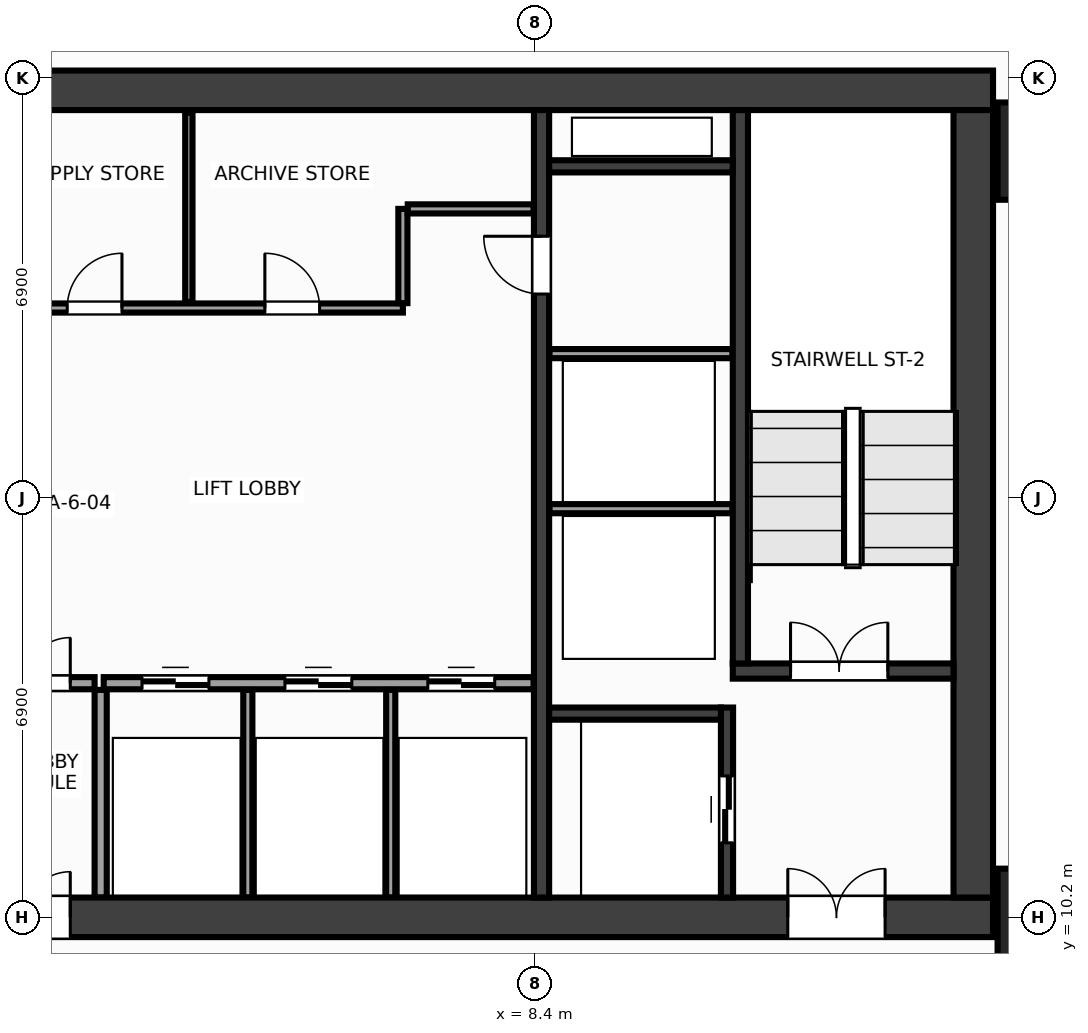
"""IFC4 building model, lengths in metres.
Left out: names, types, materials, properties, quantities, classifications, styles, units other than length and angle.
Written with IfcOpenShell. Run it as: python <this file> out.ifc"""

import sys

from ifc_helpers import new_model, si_unit, direction, frame, frame_2d, origin, origin_2d, place, context, subcontext, project, spatial, rectangle, extrude, source, transform, mapped, element, fill, save


model = new_model("IFC4")
c1 = context("Model", 3, precision=1e-05, world=origin(), true_north=direction((0.0, 1.0)))
c2 = subcontext(c1, "Body", "Model", "MODEL_VIEW")
j1 = project(units=[si_unit("LENGTHUNIT", "METRE"), si_unit("PLANEANGLEUNIT", "RADIAN")], contexts=[c1])
p1 = place(None, origin())
s1 = spatial("IfcSite", under=j1, at=p1, CompositionType="ELEMENT")
p2 = place(p1, origin())
s2 = spatial("IfcBuilding", under=s1, at=p2, CompositionType="ELEMENT")
p3 = place(p2, frame((0.0, 0.0, 95.6)))
s3 = spatial("IfcBuildingStorey", under=s2, at=p3, CompositionType="ELEMENT", Elevation=95.6)
m1 = source(origin(), c2, "Body", "SweptSolid", [
    extrude(rectangle(XDim=31.85, YDim=0.65, at=frame_2d((15.925, 0.0))), origin(), (0.0, 0.0, 1.0), 3.6),
])
p4 = place(p3, frame((-15.925, 23.8, 0.0), z_axis=(0.0, 0.0, 1.0), x_axis=(1.0, 0.0, 0.0)))
e1 = element("IfcWall", 1, at=p4, inside=s3, PredefinedType="SHEAR", context=c2, shape_type="MappedRepresentation", body=[
    mapped(m1, transform((0.0, 0.0, 0.0), x_axis=(1.0, 0.0, 0.0), y_axis=(0.0, 1.0, 0.0), z_axis=(0.0, 0.0, 1.0), scale=1.0)),
])
p5 = place(p3, frame((-15.925, 10.2, 0.0), z_axis=(0.0, 0.0, 1.0), x_axis=(1.0, 0.0, 0.0)))
e2 = element("IfcWall", 2, at=p5, inside=s3, PredefinedType="SHEAR", context=c2, shape_type="MappedRepresentation", body=[
    mapped(m1, transform((0.0, 0.0, 0.0), x_axis=(1.0, 0.0, 0.0), y_axis=(0.0, 1.0, 0.0), z_axis=(0.0, 0.0, 1.0), scale=1.0)),
])
p6 = place(p5, frame((1.775, 0.0, 0.0)))
e3 = element("IfcOpeningElement", 3, at=p6, cuts=e2, PredefinedType="OPENING", context=c2, shape_type="SweptSolid", body=[
    extrude(rectangle(XDim=1.6, YDim=2.15, at=frame_2d((0.8, 1.075))), frame((0.0, 0.337, 0.0), z_axis=(0.0, -1.0, 0.0), x_axis=(1.0, 0.0, 0.0)), (0.0, 0.0, 1.0), 0.674),
])
p7 = place(p5, frame((28.475, 0.0, 0.0)))
e4 = element("IfcOpeningElement", 4, at=p7, cuts=e2, PredefinedType="OPENING", context=c2, shape_type="SweptSolid", body=[
    extrude(rectangle(XDim=1.6, YDim=2.15, at=frame_2d((0.8, 1.075))), frame((0.0, 0.337, 0.0), z_axis=(0.0, -1.0, 0.0), x_axis=(1.0, 0.0, 0.0)), (0.0, 0.0, 1.0), 0.674),
])
p8 = place(p5, frame((15.175, 0.0, 0.0)))
e5 = element("IfcOpeningElement", 5, at=p8, cuts=e2, PredefinedType="OPENING", context=c2, shape_type="SweptSolid", body=[
    extrude(rectangle(XDim=1.5, YDim=2.2, at=frame_2d((0.75, 1.1))), frame((0.0, 0.337, 0.0), z_axis=(0.0, -1.0, 0.0), x_axis=(1.0, 0.0, 0.0)), (0.0, 0.0, 1.0), 0.674),
])
m2 = source(origin(), c2, "Body", "SweptSolid", [
    extrude(rectangle(XDim=12.95, YDim=0.65, at=frame_2d((6.475, 0.0))), origin(), (0.0, 0.0, 1.0), 3.6),
])
p9 = place(p3, frame((15.6, 10.525, 0.0), z_axis=(0.0, 0.0, 1.0), x_axis=(0.0, 1.0, 0.0)))
e6 = element("IfcWall", 6, at=p9, inside=s3, PredefinedType="SHEAR", context=c2, shape_type="MappedRepresentation", body=[
    mapped(m2, transform((0.0, 0.0, 0.0), x_axis=(1.0, 0.0, 0.0), y_axis=(0.0, 1.0, 0.0), z_axis=(0.0, 0.0, 1.0), scale=1.0)),
])
m3 = source(origin(), c2, "Body", "SweptSolid", [
    extrude(rectangle(XDim=12.95, YDim=0.25, at=frame_2d((6.475, 0.0))), origin(), (0.0, 0.0, 1.0), 3.6),
])
p10 = place(p3, frame((8.5, 10.525, 0.0), z_axis=(0.0, 0.0, 1.0), x_axis=(0.0, 1.0, 0.0)))
e7 = element("IfcWall", 7, at=p10, inside=s3, PredefinedType="SHEAR", context=c2, shape_type="MappedRepresentation", body=[
    mapped(m3, transform((0.0, 0.0, 0.0), x_axis=(1.0, 0.0, 0.0), y_axis=(0.0, 1.0, 0.0), z_axis=(0.0, 0.0, 1.0), scale=1.0)),
])
p11 = place(p10, frame((9.925, 0.0, 0.0)))
e8 = element("IfcOpeningElement", 8, at=p11, cuts=e7, PredefinedType="OPENING", context=c2, shape_type="SweptSolid", body=[
    extrude(rectangle(XDim=0.95, YDim=2.15, at=frame_2d((0.475, 1.075))), frame((0.0, 0.137, 0.0), z_axis=(0.0, -1.0, 0.0), x_axis=(1.0, 0.0, 0.0)), (0.0, 0.0, 1.0), 0.274),
])
m4 = source(origin(), c2, "Body", "SweptSolid", [
    extrude(rectangle(XDim=3.63, YDim=0.25, at=frame_2d((1.815, 0.0))), origin(), (0.0, 0.0, 1.0), 3.6),
])
p12 = place(p3, frame((11.645, 14.25, 0.0), z_axis=(0.0, 0.0, 1.0), x_axis=(1.0, 0.0, 0.0)))
e9 = element("IfcWall", 9, at=p12, inside=s3, PredefinedType="SHEAR", context=c2, shape_type="MappedRepresentation", body=[
    mapped(m4, transform((0.0, 0.0, 0.0), x_axis=(1.0, 0.0, 0.0), y_axis=(0.0, 1.0, 0.0), z_axis=(0.0, 0.0, 1.0), scale=1.0)),
])
p13 = place(p12, frame((0.95, 0.0, 0.0)))
e10 = element("IfcOpeningElement", 10, at=p13, cuts=e9, PredefinedType="OPENING", context=c2, shape_type="SweptSolid", body=[
    extrude(rectangle(XDim=1.6, YDim=2.15, at=frame_2d((0.8, 1.075))), frame((0.0, 0.137, 0.0), z_axis=(0.0, -1.0, 0.0), x_axis=(1.0, 0.0, 0.0)), (0.0, 0.0, 1.0), 0.274),
])
m5 = source(origin(), c2, "Body", "SweptSolid", [
    extrude(rectangle(XDim=9.1, YDim=0.25, at=frame_2d((4.55, 0.0))), origin(), (0.0, 0.0, 1.0), 3.6),
])
p14 = place(p3, frame((11.77, 14.375, 0.0), z_axis=(0.0, 0.0, 1.0), x_axis=(0.0, 1.0, 0.0)))
e11 = element("IfcWall", 11, at=p14, inside=s3, PredefinedType="SHEAR", context=c2, shape_type="MappedRepresentation", body=[
    mapped(m5, transform((0.0, 0.0, 0.0), x_axis=(1.0, 0.0, 0.0), y_axis=(0.0, 1.0, 0.0), z_axis=(0.0, 0.0, 1.0), scale=1.0)),
])
m6 = source(origin(), c2, "Body", "SweptSolid", [
    extrude(rectangle(XDim=3.125, YDim=0.2, at=frame_2d((1.562, 0.0))), origin(), (0.0, 0.0, 1.0), 3.6),
])
p15 = place(p3, frame((11.55, 10.525, 0.0), z_axis=(0.0, 0.0, 1.0), x_axis=(0.0, 1.0, 0.0)))
e12 = element("IfcWall", 12, at=p15, inside=s3, PredefinedType="SHEAR", context=c2, shape_type="MappedRepresentation", body=[
    mapped(m6, transform((0.0, 0.0, 0.0), x_axis=(1.0, 0.0, 0.0), y_axis=(0.0, 1.0, 0.0), z_axis=(0.0, 0.0, 1.0), scale=1.0)),
])
p16 = place(p15, frame((0.9, 0.0, 0.0)))
e13 = element("IfcOpeningElement", 13, at=p16, cuts=e12, PredefinedType="OPENING", context=c2, shape_type="SweptSolid", body=[
    extrude(rectangle(XDim=1.1, YDim=2.15, at=frame_2d((0.55, 1.075))), frame((0.0, 0.112, 0.0), z_axis=(0.0, -1.0, 0.0), x_axis=(1.0, 0.0, 0.0)), (0.0, 0.0, 1.0), 0.224),
])
m7 = source(origin(), c2, "Body", "SweptSolid", [
    extrude(rectangle(XDim=2.825, YDim=0.2, at=frame_2d((1.413, 0.0))), origin(), (0.0, 0.0, 1.0), 3.6),
])
p17 = place(p3, frame((8.625, 13.55, 0.0), z_axis=(0.0, 0.0, 1.0), x_axis=(1.0, 0.0, 0.0)))
e14 = element("IfcWall", 14, at=p17, inside=s3, PredefinedType="SHEAR", context=c2, shape_type="MappedRepresentation", body=[
    mapped(m7, transform((0.0, 0.0, 0.0), x_axis=(1.0, 0.0, 0.0), y_axis=(0.0, 1.0, 0.0), z_axis=(0.0, 0.0, 1.0), scale=1.0)),
])
m8 = source(origin(), c2, "Body", "SweptSolid", [
    extrude(rectangle(XDim=3.02, YDim=0.2, at=frame_2d((1.51, 0.0))), origin(), (0.0, 0.0, 1.0), 3.6),
])
p18 = place(p3, frame((8.625, 22.55, 0.0), z_axis=(0.0, 0.0, 1.0), x_axis=(1.0, 0.0, 0.0)))
e15 = element("IfcWall", 15, at=p18, inside=s3, PredefinedType="SHEAR", context=c2, shape_type="MappedRepresentation", body=[
    mapped(m8, transform((0.0, 0.0, 0.0), x_axis=(1.0, 0.0, 0.0), y_axis=(0.0, 1.0, 0.0), z_axis=(0.0, 0.0, 1.0), scale=1.0)),
])
m9 = source(origin(), c2, "Body", "SweptSolid", [
    extrude(rectangle(XDim=1.6, YDim=1.6, at=origin_2d()), origin(), (0.0, 0.0, 1.0), 3.6),
])
for number, where, z_axis, x_axis in (
    (16, (16.8, 10.2, 0.0), (0.0, 0.0, 1.0), (1.0, 0.0, 0.0)),
    (17, (16.8, 22.8, 0.0), (0.0, 0.0, 1.0), (1.0, 0.0, 0.0)),
):
    element("IfcColumn", number, at=place(p3, frame(where, z_axis=z_axis, x_axis=x_axis)), inside=s3, PredefinedType="COLUMN", context=c2, shape_type="MappedRepresentation", body=[
        mapped(m9, transform((0.0, 0.0, 0.0), x_axis=(1.0, 0.0, 0.0), y_axis=(0.0, 1.0, 0.0), z_axis=(0.0, 0.0, 1.0), scale=1.0)),
    ])
m10 = source(origin(), c2, "Body", "SweptSolid", [
    extrude(rectangle(XDim=3.01, YDim=0.15, at=frame_2d((1.505, 0.0))), origin(), (0.0, 0.0, 1.0), 3.36),
])
for number, where, z_axis, x_axis in (
    (18, (8.63, 16.92, 0.0), (0.0, 0.0, 1.0), (1.0, 0.0, 0.0)),
    (19, (8.63, 19.47, 0.0), (0.0, 0.0, 1.0), (1.0, 0.0, 0.0)),
):
    element("IfcWall", number, at=place(p3, frame(where, z_axis=z_axis, x_axis=x_axis)), inside=s3, PredefinedType="PARTITIONING", context=c2, shape_type="MappedRepresentation", body=[
        mapped(m10, transform((0.0, 0.0, 0.0), x_axis=(1.0, 0.0, 0.0), y_axis=(0.0, 1.0, 0.0), z_axis=(0.0, 0.0, 1.0), scale=1.0)),
    ])
m11 = source(origin(), c2, "Body", "SweptSolid", [
    extrude(rectangle(XDim=7.07, YDim=0.2, at=frame_2d((3.535, 0.0))), origin(), (0.0, 0.0, 1.0), 3.36),
])
p19 = place(p3, frame((1.3, 14.05, 0.0), z_axis=(0.0, 0.0, 1.0), x_axis=(1.0, 0.0, 0.0)))
e20 = element("IfcWall", 20, at=p19, inside=s3, PredefinedType="PARTITIONING", context=c2, shape_type="MappedRepresentation", body=[
    mapped(m11, transform((0.0, 0.0, 0.0), x_axis=(1.0, 0.0, 0.0), y_axis=(0.0, 1.0, 0.0), z_axis=(0.0, 0.0, 1.0), scale=1.0)),
])
p20 = place(p19, frame((0.63, 0.0, 0.0)))
e21 = element("IfcOpeningElement", 21, at=p20, cuts=e20, PredefinedType="OPENING", context=c2, shape_type="SweptSolid", body=[
    extrude(rectangle(XDim=1.1, YDim=2.15, at=frame_2d((0.55, 1.075))), frame((0.0, 0.112, 0.0), z_axis=(0.0, -1.0, 0.0), x_axis=(1.0, 0.0, 0.0)), (0.0, 0.0, 1.0), 0.224),
])
p21 = place(p19, frame((2.98, 0.0, 0.0)))
e22 = element("IfcOpeningElement", 22, at=p21, cuts=e20, PredefinedType="OPENING", context=c2, shape_type="SweptSolid", body=[
    extrude(rectangle(XDim=1.1, YDim=2.15, at=frame_2d((0.55, 1.075))), frame((0.0, 0.112, 0.0), z_axis=(0.0, -1.0, 0.0), x_axis=(1.0, 0.0, 0.0)), (0.0, 0.0, 1.0), 0.224),
])
p22 = place(p19, frame((5.33, 0.0, 0.0)))
e23 = element("IfcOpeningElement", 23, at=p22, cuts=e20, PredefinedType="OPENING", context=c2, shape_type="SweptSolid", body=[
    extrude(rectangle(XDim=1.1, YDim=2.15, at=frame_2d((0.55, 1.075))), frame((0.0, 0.112, 0.0), z_axis=(0.0, -1.0, 0.0), x_axis=(1.0, 0.0, 0.0)), (0.0, 0.0, 1.0), 0.224),
])
m12 = source(origin(), c2, "Body", "SweptSolid", [
    extrude(rectangle(XDim=3.415, YDim=0.2, at=frame_2d((1.708, 0.0))), origin(), (0.0, 0.0, 1.0), 3.36),
])
p23 = place(p3, frame((1.25, 10.525, 0.0), z_axis=(0.0, 0.0, 1.0), x_axis=(0.0, 1.0, 0.0)))
e24 = element("IfcWall", 24, at=p23, inside=s3, PredefinedType="PARTITIONING", context=c2, shape_type="MappedRepresentation", body=[
    mapped(m12, transform((0.0, 0.0, 0.0), x_axis=(1.0, 0.0, 0.0), y_axis=(0.0, 1.0, 0.0), z_axis=(0.0, 0.0, 1.0), scale=1.0)),
])
m13 = source(origin(), c2, "Body", "SweptSolid", [
    extrude(rectangle(XDim=2.3, YDim=0.2, at=frame_2d((1.15, 0.0))), origin(), (0.0, 0.0, 1.0), 3.36),
])
p24 = place(p3, frame((-1.15, 14.05, 0.0), z_axis=(0.0, 0.0, 1.0), x_axis=(1.0, 0.0, 0.0)))
e25 = element("IfcWall", 25, at=p24, inside=s3, PredefinedType="PARTITIONING", context=c2, shape_type="MappedRepresentation", body=[
    mapped(m13, transform((0.0, 0.0, 0.0), x_axis=(1.0, 0.0, 0.0), y_axis=(0.0, 1.0, 0.0), z_axis=(0.0, 0.0, 1.0), scale=1.0)),
])
p25 = place(p24, frame((0.4, 0.0, 0.0)))
e26 = element("IfcOpeningElement", 26, at=p25, cuts=e25, PredefinedType="OPENING", context=c2, shape_type="SweptSolid", body=[
    extrude(rectangle(XDim=1.5, YDim=2.2, at=frame_2d((0.75, 1.1))), frame((0.0, 0.112, 0.0), z_axis=(0.0, -1.0, 0.0), x_axis=(1.0, 0.0, 0.0)), (0.0, 0.0, 1.0), 0.224),
])
m14 = source(origin(), c2, "Body", "SweptSolid", [
    extrude(rectangle(XDim=14.59, YDim=0.15, at=frame_2d((7.295, 0.0))), origin(), (0.0, 0.0, 1.0), 3.36),
])
p26 = place(p3, frame((-8.37, 20.22, 0.0), z_axis=(0.0, 0.0, 1.0), x_axis=(1.0, 0.0, 0.0)))
e27 = element("IfcWall", 27, at=p26, inside=s3, PredefinedType="PARTITIONING", context=c2, shape_type="MappedRepresentation", body=[
    mapped(m14, transform((0.0, 0.0, 0.0), x_axis=(1.0, 0.0, 0.0), y_axis=(0.0, 1.0, 0.0), z_axis=(0.0, 0.0, 1.0), scale=1.0)),
])
p27 = place(p26, frame((0.86, 0.0, 0.0)))
e28 = element("IfcOpeningElement", 28, at=p27, cuts=e27, PredefinedType="OPENING", context=c2, shape_type="SweptSolid", body=[
    extrude(rectangle(XDim=0.9, YDim=2.15, at=frame_2d((0.45, 1.075))), frame((0.0, 0.087, 0.0), z_axis=(0.0, -1.0, 0.0), x_axis=(1.0, 0.0, 0.0)), (0.0, 0.0, 1.0), 0.174),
])
p28 = place(p26, frame((3.47, 0.0, 0.0)))
e29 = element("IfcOpeningElement", 29, at=p28, cuts=e27, PredefinedType="OPENING", context=c2, shape_type="SweptSolid", body=[
    extrude(rectangle(XDim=0.9, YDim=2.15, at=frame_2d((0.45, 1.075))), frame((0.0, 0.087, 0.0), z_axis=(0.0, -1.0, 0.0), x_axis=(1.0, 0.0, 0.0)), (0.0, 0.0, 1.0), 0.174),
])
p29 = place(p26, frame((6.17, 0.0, 0.0)))
e30 = element("IfcOpeningElement", 30, at=p29, cuts=e27, PredefinedType="OPENING", context=c2, shape_type="SweptSolid", body=[
    extrude(rectangle(XDim=0.9, YDim=2.15, at=frame_2d((0.45, 1.075))), frame((0.0, 0.087, 0.0), z_axis=(0.0, -1.0, 0.0), x_axis=(1.0, 0.0, 0.0)), (0.0, 0.0, 1.0), 0.174),
])
p30 = place(p26, frame((9.07, 0.0, 0.0)))
e31 = element("IfcOpeningElement", 31, at=p30, cuts=e27, PredefinedType="OPENING", context=c2, shape_type="SweptSolid", body=[
    extrude(rectangle(XDim=0.9, YDim=2.15, at=frame_2d((0.45, 1.075))), frame((0.0, 0.087, 0.0), z_axis=(0.0, -1.0, 0.0), x_axis=(1.0, 0.0, 0.0)), (0.0, 0.0, 1.0), 0.174),
])
p31 = place(p26, frame((12.32, 0.0, 0.0)))
e32 = element("IfcOpeningElement", 32, at=p31, cuts=e27, PredefinedType="OPENING", context=c2, shape_type="SweptSolid", body=[
    extrude(rectangle(XDim=0.9, YDim=2.15, at=frame_2d((0.45, 1.075))), frame((0.0, 0.087, 0.0), z_axis=(0.0, -1.0, 0.0), x_axis=(1.0, 0.0, 0.0)), (0.0, 0.0, 1.0), 0.174),
])
m15 = source(origin(), c2, "Body", "SweptSolid", [
    extrude(rectangle(XDim=1.55, YDim=0.15, at=frame_2d((0.775, 0.0))), origin(), (0.0, 0.0, 1.0), 3.36),
])
p32 = place(p3, frame((6.22, 20.3, 0.0), z_axis=(0.0, 0.0, 1.0), x_axis=(0.0, 1.0, 0.0)))
e33 = element("IfcWall", 33, at=p32, inside=s3, PredefinedType="PARTITIONING", context=c2, shape_type="MappedRepresentation", body=[
    mapped(m15, transform((0.0, 0.0, 0.0), x_axis=(1.0, 0.0, 0.0), y_axis=(0.0, 1.0, 0.0), z_axis=(0.0, 0.0, 1.0), scale=1.0)),
])
m16 = source(origin(), c2, "Body", "SweptSolid", [
    extrude(rectangle(XDim=2.07, YDim=0.15, at=frame_2d((1.035, 0.0))), origin(), (0.0, 0.0, 1.0), 3.36),
])
p33 = place(p3, frame((6.3, 21.85, 0.0), z_axis=(0.0, 0.0, 1.0), x_axis=(1.0, 0.0, 0.0)))
e34 = element("IfcWall", 34, at=p33, inside=s3, PredefinedType="PARTITIONING", context=c2, shape_type="MappedRepresentation", body=[
    mapped(m16, transform((0.0, 0.0, 0.0), x_axis=(1.0, 0.0, 0.0), y_axis=(0.0, 1.0, 0.0), z_axis=(0.0, 0.0, 1.0), scale=1.0)),
])
m17 = source(origin(), c2, "Body", "SweptSolid", [
    extrude(rectangle(XDim=3.415, YDim=0.15, at=frame_2d((1.708, 0.0))), origin(), (0.0, 0.0, 1.0), 3.36),
])
for number, where, z_axis, x_axis in (
    (35, (3.67, 10.525, 0.0), (0.0, 0.0, 1.0), (0.0, 1.0, 0.0)),
    (36, (6.02, 10.525, 0.0), (0.0, 0.0, 1.0), (0.0, 1.0, 0.0)),
):
    element("IfcWall", number, at=place(p3, frame(where, z_axis=z_axis, x_axis=x_axis)), inside=s3, PredefinedType="PARTITIONING", context=c2, shape_type="MappedRepresentation", body=[
        mapped(m17, transform((0.0, 0.0, 0.0), x_axis=(1.0, 0.0, 0.0), y_axis=(0.0, 1.0, 0.0), z_axis=(0.0, 0.0, 1.0), scale=1.0)),
    ])
m18 = source(origin(), c2, "Body", "SweptSolid", [
    extrude(rectangle(XDim=3.115, YDim=0.12, at=frame_2d((1.558, 0.0))), origin(), (0.0, 0.0, 1.0), 3.36),
])
p34 = place(p3, frame((2.7, 20.32, 0.0), z_axis=(0.0, 0.0, 1.0), x_axis=(0.0, 1.0, 0.0)))
e37 = element("IfcWall", 37, at=p34, inside=s3, PredefinedType="PARTITIONING", context=c2, shape_type="MappedRepresentation", body=[
    mapped(m18, transform((0.0, 0.0, 0.0), x_axis=(1.0, 0.0, 0.0), y_axis=(0.0, 1.0, 0.0), z_axis=(0.0, 0.0, 1.0), scale=1.0)),
])
m19 = source(origin(), c2, "Body", "SweptSolid", [
    extrude(rectangle(XDim=1.6, YDim=2.15, at=frame_2d((0.8, 1.075))), frame((0.0, 0.025, 0.0), z_axis=(0.0, -1.0, 0.0), x_axis=(1.0, 0.0, 0.0)), (0.0, 0.0, 1.0), 0.05),
])
p35 = place(p13, origin())
e38 = element("IfcDoor", 38, at=p35, inside=s3, OperationType="DOUBLE_DOOR_SINGLE_SWING", PredefinedType="DOOR", context=c2, shape_type="MappedRepresentation", body=[
    mapped(m19, transform((0.0, 0.0, 0.0), x_axis=(1.0, 0.0, 0.0), y_axis=(0.0, 1.0, 0.0), z_axis=(0.0, 0.0, 1.0), scale=1.0)),
])
fill(e10, e38)
p36 = place(p7, origin())
e39 = element("IfcDoor", 39, at=p36, inside=s3, OperationType="DOUBLE_DOOR_SINGLE_SWING", PredefinedType="DOOR", context=c2, shape_type="MappedRepresentation", body=[
    mapped(m19, transform((0.0, 0.0, 0.0), x_axis=(1.0, 0.0, 0.0), y_axis=(0.0, 1.0, 0.0), z_axis=(0.0, 0.0, 1.0), scale=1.0)),
])
fill(e4, e39)
m20 = source(origin(), c2, "Body", "SweptSolid", [
    extrude(rectangle(XDim=1.1, YDim=2.15, at=frame_2d((0.55, 1.075))), frame((0.0, 0.025, 0.0), z_axis=(0.0, -1.0, 0.0), x_axis=(1.0, 0.0, 0.0)), (0.0, 0.0, 1.0), 0.05),
])
p37 = place(p16, origin())
e40 = element("IfcDoor", 40, at=p37, inside=s3, OperationType="DOUBLE_DOOR_SLIDING", PredefinedType="DOOR", context=c2, shape_type="MappedRepresentation", body=[
    mapped(m20, transform((0.0, 0.0, 0.0), x_axis=(1.0, 0.0, 0.0), y_axis=(0.0, 1.0, 0.0), z_axis=(0.0, 0.0, 1.0), scale=1.0)),
])
fill(e13, e40)
m21 = source(origin(), c2, "Body", "SweptSolid", [
    extrude(rectangle(XDim=0.95, YDim=2.15, at=frame_2d((0.475, 1.075))), frame((0.0, 0.025, 0.0), z_axis=(0.0, -1.0, 0.0), x_axis=(1.0, 0.0, 0.0)), (0.0, 0.0, 1.0), 0.05),
])
p38 = place(p11, origin())
e41 = element("IfcDoor", 41, at=p38, inside=s3, OperationType="SINGLE_SWING_RIGHT", PredefinedType="DOOR", context=c2, shape_type="MappedRepresentation", body=[
    mapped(m21, transform((0.0, 0.0, 0.0), x_axis=(1.0, 0.0, 0.0), y_axis=(0.0, 1.0, 0.0), z_axis=(0.0, 0.0, 1.0), scale=1.0)),
])
fill(e8, e41)
p39 = place(p20, origin())
e42 = element("IfcDoor", 42, at=p39, inside=s3, OperationType="DOUBLE_DOOR_SLIDING", PredefinedType="DOOR", context=c2, shape_type="MappedRepresentation", body=[
    mapped(m20, transform((0.0, 0.0, 0.0), x_axis=(1.0, 0.0, 0.0), y_axis=(0.0, 1.0, 0.0), z_axis=(0.0, 0.0, 1.0), scale=1.0)),
])
fill(e21, e42)
p40 = place(p21, origin())
e43 = element("IfcDoor", 43, at=p40, inside=s3, OperationType="DOUBLE_DOOR_SLIDING", PredefinedType="DOOR", context=c2, shape_type="MappedRepresentation", body=[
    mapped(m20, transform((0.0, 0.0, 0.0), x_axis=(1.0, 0.0, 0.0), y_axis=(0.0, 1.0, 0.0), z_axis=(0.0, 0.0, 1.0), scale=1.0)),
])
fill(e22, e43)
p41 = place(p22, origin())
e44 = element("IfcDoor", 44, at=p41, inside=s3, OperationType="DOUBLE_DOOR_SLIDING", PredefinedType="DOOR", context=c2, shape_type="MappedRepresentation", body=[
    mapped(m20, transform((0.0, 0.0, 0.0), x_axis=(1.0, 0.0, 0.0), y_axis=(0.0, 1.0, 0.0), z_axis=(0.0, 0.0, 1.0), scale=1.0)),
])
fill(e23, e44)
m22 = source(origin(), c2, "Body", "SweptSolid", [
    extrude(rectangle(XDim=1.5, YDim=2.2, at=frame_2d((0.75, 1.1))), frame((0.0, 0.025, 0.0), z_axis=(0.0, -1.0, 0.0), x_axis=(1.0, 0.0, 0.0)), (0.0, 0.0, 1.0), 0.05),
])
p42 = place(p25, origin())
e45 = element("IfcDoor", 45, at=p42, inside=s3, OperationType="DOUBLE_DOOR_SINGLE_SWING", PredefinedType="DOOR", context=c2, shape_type="MappedRepresentation", body=[
    mapped(m22, transform((0.0, 0.0, 0.0), x_axis=(1.0, 0.0, 0.0), y_axis=(0.0, 1.0, 0.0), z_axis=(0.0, 0.0, 1.0), scale=1.0)),
])
fill(e26, e45)
p43 = place(p8, origin())
e46 = element("IfcDoor", 46, at=p43, inside=s3, OperationType="DOUBLE_DOOR_SINGLE_SWING", PredefinedType="DOOR", context=c2, shape_type="MappedRepresentation", body=[
    mapped(m22, transform((0.0, 0.0, 0.0), x_axis=(1.0, 0.0, 0.0), y_axis=(0.0, 1.0, 0.0), z_axis=(0.0, 0.0, 1.0), scale=1.0)),
])
fill(e5, e46)
m23 = source(origin(), c2, "Body", "SweptSolid", [
    extrude(rectangle(XDim=0.9, YDim=2.15, at=frame_2d((0.45, 1.075))), frame((0.0, 0.025, 0.0), z_axis=(0.0, -1.0, 0.0), x_axis=(1.0, 0.0, 0.0)), (0.0, 0.0, 1.0), 0.05),
])
p44 = place(p30, origin())
e47 = element("IfcDoor", 47, at=p44, inside=s3, OperationType="SINGLE_SWING_RIGHT", PredefinedType="DOOR", context=c2, shape_type="MappedRepresentation", body=[
    mapped(m23, transform((0.0, 0.0, 0.0), x_axis=(1.0, 0.0, 0.0), y_axis=(0.0, 1.0, 0.0), z_axis=(0.0, 0.0, 1.0), scale=1.0)),
])
fill(e31, e47)
p45 = place(p31, origin())
e48 = element("IfcDoor", 48, at=p45, inside=s3, OperationType="SINGLE_SWING_LEFT", PredefinedType="DOOR", context=c2, shape_type="MappedRepresentation", body=[
    mapped(m23, transform((0.0, 0.0, 0.0), x_axis=(1.0, 0.0, 0.0), y_axis=(0.0, 1.0, 0.0), z_axis=(0.0, 0.0, 1.0), scale=1.0)),
])
fill(e32, e48)
save(model, sys.argv[1])
